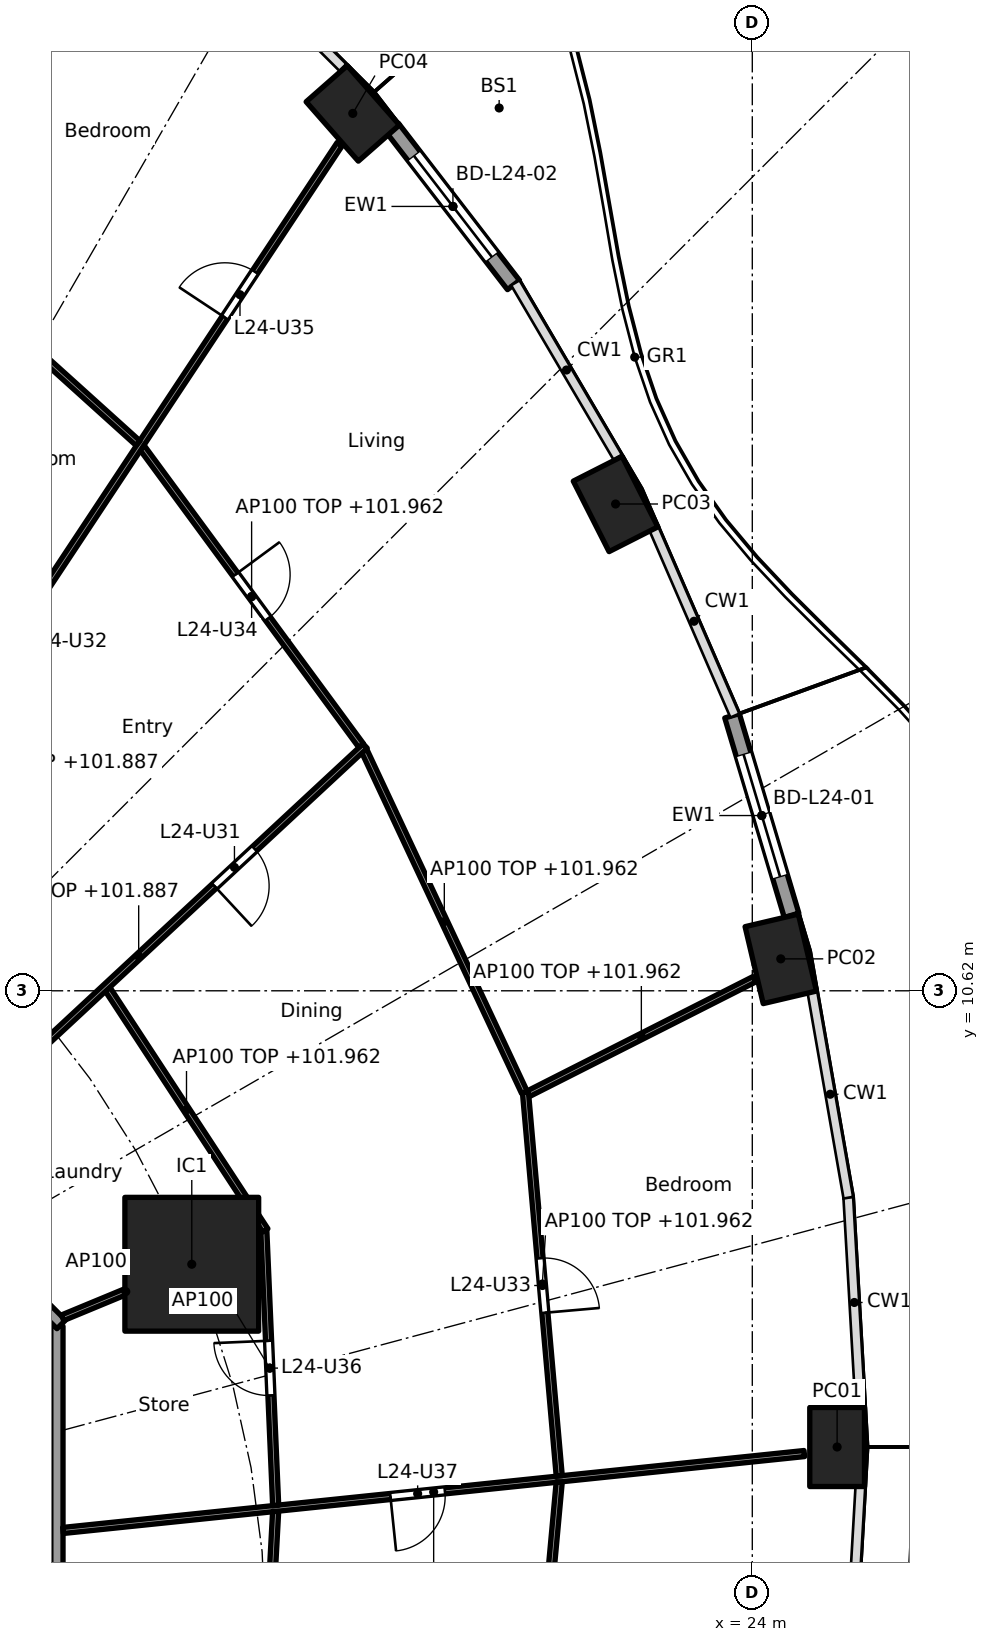
"""IFC4 building model, lengths in metres.
Left out: names, types, materials, properties, quantities, classifications, styles, units other than length and angle.
Written with IfcOpenShell. Run it as: python <this file> out.ifc"""

import sys

from ifc_helpers import new_model, si_unit, direction, frame, frame_2d, origin, origin_2d, place, context, subcontext, project, spatial, rectangle, hollow_rectangle, extrude, element, fill, save


model = new_model("IFC4")
c1 = context("Model", 3, precision=1e-05, world=origin(), true_north=direction((0.0, 1.0)))
c2 = subcontext(c1, "Body", "Model", "MODEL_VIEW")
j1 = project(units=[si_unit("LENGTHUNIT", "METRE"), si_unit("PLANEANGLEUNIT", "RADIAN")], contexts=[c1])
p1 = place(None, origin())
s1 = spatial("IfcSite", under=j1, at=p1, CompositionType="ELEMENT")
p2 = place(p1, origin())
s2 = spatial("IfcBuilding", under=s1, at=p2, CompositionType="ELEMENT")
p3 = place(p2, frame((0.0, 0.0, 99.2)))
s3 = spatial("IfcBuildingStorey", under=s2, at=p3, CompositionType="ELEMENT", Elevation=99.2)
for number, where, z_axis, x_axis in (
    (1, (25.395, 3.118, 0.0), (0.0, 0.0, 1.0), (0.0, 1.0, 0.0)),
    (2, (24.468, 11.145, 0.0), (0.0, 0.0, 1.0), (-0.229, 0.973, 0.0)),
    (3, (21.751, 18.625, 0.0), (0.0, 0.0, 1.0), (-0.452, 0.892, 0.0)),
    (4, (17.43, 25.049, 0.0), (0.0, 0.0, 1.0), (-0.66, 0.751, 0.0)),
):
    element("IfcColumn", number, at=place(p3, frame(where, z_axis=z_axis, x_axis=x_axis)), inside=s3, PredefinedType="COLUMN", context=c2, shape_type="SweptSolid", body=[
        extrude(hollow_rectangle(XDim=1.3, YDim=0.9, WallThickness=0.045, at=origin_2d()), origin(), (0.0, 0.0, 1.0), 3.7),
    ])
p4 = place(p3, frame((14.782, 6.123, 0.0), z_axis=(0.0, 0.0, 1.0), x_axis=(1.0, 0.0, 0.0)))
e5 = element("IfcColumn", 5, at=p4, inside=s3, PredefinedType="COLUMN", context=c2, shape_type="SweptSolid", body=[
    extrude(rectangle(XDim=2.2, YDim=2.2, at=origin_2d()), origin(), (0.0, 0.0, 1.0), 3.7),
])
p5 = place(p3, frame((23.667, 15.142, 0.0), z_axis=(0.0, 0.0, 1.0), x_axis=(0.285882094477, -0.958264800594, 0.0)))
e6 = element("IfcWall", 6, at=p5, inside=s3, PredefinedType="SOLIDWALL", context=c2, shape_type="SweptSolid", body=[
    extrude(rectangle(XDim=3.424, YDim=0.25, at=frame_2d((1.712, 0.0))), origin(), (0.0, 0.0, 1.0), 3.44),
])
p6 = place(p5, frame((0.662, 0.0, 0.0)))
e7 = element("IfcOpeningElement", 7, at=p6, cuts=e6, PredefinedType="OPENING", context=c2, shape_type="SweptSolid", body=[
    extrude(rectangle(XDim=2.1, YDim=2.4, at=frame_2d((1.05, 1.2))), frame((0.0, 0.135, 0.0), z_axis=(0.0, -1.0, 0.0), x_axis=(1.0, 0.0, 0.0)), (0.0, 0.0, 1.0), 0.27),
])
p7 = place(p3, frame((18.081, 24.811, 0.0), z_axis=(0.0, 0.0, 1.0), x_axis=(0.610458970322, -0.792047880847, 0.0)))
e8 = element("IfcWall", 8, at=p7, inside=s3, PredefinedType="SOLIDWALL", context=c2, shape_type="SweptSolid", body=[
    extrude(rectangle(XDim=3.263, YDim=0.25, at=frame_2d((1.631, 0.0))), origin(), (0.0, 0.0, 1.0), 3.44),
])
p8 = place(p7, frame((0.582, 0.0, 0.0)))
e9 = element("IfcOpeningElement", 9, at=p8, cuts=e8, PredefinedType="OPENING", context=c2, shape_type="SweptSolid", body=[
    extrude(rectangle(XDim=2.1, YDim=2.4, at=frame_2d((1.05, 1.2))), frame((0.0, 0.135, 0.0), z_axis=(0.0, -1.0, 0.0), x_axis=(1.0, 0.0, 0.0)), (0.0, 0.0, 1.0), 0.27),
])
p9 = place(p3, frame((12.565, -5.104, 0.0), z_axis=(0.0, 0.0, 1.0), x_axis=(0.0, 1.0, 0.0)))
e10 = element("IfcWall", 10, at=p9, inside=s3, PredefinedType="PARTITIONING", context=c2, shape_type="SweptSolid", body=[
    extrude(rectangle(XDim=10.209, YDim=0.2, at=frame_2d((5.104, 0.0))), origin(), (0.0, 0.0, 1.0), 3.44),
])
p10 = place(p3, frame((12.635, 5.134, 0.0), z_axis=(0.0, 0.0, 1.0), x_axis=(-0.707106781187, 0.707106781187, 0.0)))
e11 = element("IfcWall", 11, at=p10, inside=s3, PredefinedType="PARTITIONING", context=c2, shape_type="SweptSolid", body=[
    extrude(rectangle(XDim=10.609, YDim=0.2, at=frame_2d((5.305, 0.0))), origin(), (0.0, 0.0, 1.0), 3.44),
])
p11 = place(p10, frame((4.804, 0.0, 0.0)))
e12 = element("IfcOpeningElement", 12, at=p11, cuts=e11, PredefinedType="OPENING", context=c2, shape_type="SweptSolid", body=[
    extrude(rectangle(XDim=1.0, YDim=2.1, at=frame_2d((0.5, 1.05))), frame((0.0, 0.11, 0.0), z_axis=(0.0, -1.0, 0.0), x_axis=(1.0, 0.0, 0.0)), (0.0, 0.0, 1.0), 0.22),
])
p12 = place(p3, frame((12.664, 1.745, 0.0), z_axis=(0.0, 0.0, 1.0), x_axis=(0.994662790212, 0.103179134358, 0.0)))
e13 = element("IfcWall", 13, at=p12, inside=s3, PredefinedType="PARTITIONING", context=c2, shape_type="SweptSolid", body=[
    extrude(rectangle(XDim=12.257, YDim=0.1, at=frame_2d((6.128, 0.0))), origin(), (0.0, 0.0, 1.0), 2.687),
])
p13 = place(p12, frame((5.414, 0.0, 0.0)))
e14 = element("IfcOpeningElement", 14, at=p13, cuts=e13, PredefinedType="OPENING", context=c2, shape_type="SweptSolid", body=[
    extrude(rectangle(XDim=0.9, YDim=2.1, at=frame_2d((0.45, 1.05))), frame((0.0, 0.06, 0.0), z_axis=(0.0, -1.0, 0.0), x_axis=(1.0, 0.0, 0.0)), (0.0, 0.0, 1.0), 0.12),
])
p14 = place(p3, frame((16.162, 2.158, 0.0), z_axis=(0.0, 0.0, 1.0), x_axis=(-0.043120653248, 0.999069872063, 0.0)))
e15 = element("IfcWall", 15, at=p14, inside=s3, PredefinedType="PARTITIONING", context=c2, shape_type="SweptSolid", body=[
    extrude(rectangle(XDim=4.518, YDim=0.1, at=frame_2d((2.259, 0.0))), origin(), (0.0, 0.0, 1.0), 3.44),
])
p15 = place(p14, frame((1.809, 0.0, 0.0)))
e16 = element("IfcOpeningElement", 16, at=p15, cuts=e15, PredefinedType="OPENING", context=c2, shape_type="SweptSolid", body=[
    extrude(rectangle(XDim=0.9, YDim=2.1, at=frame_2d((0.45, 1.05))), frame((0.0, 0.06, 0.0), z_axis=(0.0, -1.0, 0.0), x_axis=(1.0, 0.0, 0.0)), (0.0, 0.0, 1.0), 0.12),
])
p16 = place(p3, frame((16.161, 2.058, 0.0), z_axis=(0.0, 0.0, 1.0), x_axis=(-0.053696394729, -0.998557307916, 0.0)))
e17 = element("IfcWall", 17, at=p16, inside=s3, PredefinedType="PARTITIONING", context=c2, shape_type="SweptSolid", body=[
    extrude(rectangle(XDim=4.742, YDim=0.1, at=frame_2d((2.371, 0.0))), origin(), (0.0, 0.0, 1.0), 2.762),
])
p17 = place(p16, frame((1.896, 0.0, 0.0)))
e18 = element("IfcOpeningElement", 18, at=p17, cuts=e17, PredefinedType="OPENING", context=c2, shape_type="SweptSolid", body=[
    extrude(rectangle(XDim=0.9, YDim=2.1, at=frame_2d((0.45, 1.05))), frame((0.0, 0.06, 0.0), z_axis=(0.0, -1.0, 0.0), x_axis=(1.0, 0.0, 0.0)), (0.0, 0.0, 1.0), 0.12),
])
p18 = place(p3, frame((20.825, 2.642, 0.0), z_axis=(0.0, 0.0, 1.0), x_axis=(-0.08776338161, 0.996141349834, 0.0)))
e19 = element("IfcWall", 19, at=p18, inside=s3, PredefinedType="PARTITIONING", context=c2, shape_type="SweptSolid", body=[
    extrude(rectangle(XDim=6.337, YDim=0.1, at=frame_2d((3.168, 0.0))), origin(), (0.0, 0.0, 1.0), 2.762),
])
p19 = place(p18, frame((2.694, 0.0, 0.0)))
e20 = element("IfcOpeningElement", 20, at=p19, cuts=e19, PredefinedType="OPENING", context=c2, shape_type="SweptSolid", body=[
    extrude(rectangle(XDim=0.9, YDim=2.1, at=frame_2d((0.45, 1.05))), frame((0.0, 0.06, 0.0), z_axis=(0.0, -1.0, 0.0), x_axis=(1.0, 0.0, 0.0)), (0.0, 0.0, 1.0), 0.12),
])
p20 = place(p3, frame((20.825, 2.542, 0.0), z_axis=(0.0, 0.0, 1.0), x_axis=(-0.09140211812, -0.995814065377, 0.0)))
e21 = element("IfcWall", 21, at=p20, inside=s3, PredefinedType="PARTITIONING", context=c2, shape_type="SweptSolid", body=[
    extrude(rectangle(XDim=6.403, YDim=0.1, at=frame_2d((3.201, 0.0))), origin(), (0.0, 0.0, 1.0), 2.762),
])
p21 = place(p20, frame((2.726, 0.0, 0.0)))
e22 = element("IfcOpeningElement", 22, at=p21, cuts=e21, PredefinedType="OPENING", context=c2, shape_type="SweptSolid", body=[
    extrude(rectangle(XDim=0.9, YDim=2.1, at=frame_2d((0.45, 1.05))), frame((0.0, 0.06, 0.0), z_axis=(0.0, -1.0, 0.0), x_axis=(1.0, 0.0, 0.0)), (0.0, 0.0, 1.0), 0.12),
])
p22 = place(p3, frame((12.657, 5.243, 0.0), z_axis=(0.0, 0.0, 1.0), x_axis=(0.923864733477, 0.382719158442, 0.0)))
e23 = element("IfcWall", 23, at=p22, inside=s3, PredefinedType="PARTITIONING", context=c2, shape_type="SweptSolid", body=[
    extrude(rectangle(XDim=2.25, YDim=0.1, at=frame_2d((1.125, 0.0))), origin(), (0.0, 0.0, 1.0), 3.44),
])
p23 = place(p3, frame((15.992, 6.68, 0.0), z_axis=(0.0, 0.0, 1.0), x_axis=(-0.547472878942, 0.836823426311, 0.0)))
e24 = element("IfcWall", 24, at=p23, inside=s3, PredefinedType="PARTITIONING", context=c2, shape_type="SweptSolid", body=[
    extrude(rectangle(XDim=4.738, YDim=0.1, at=frame_2d((2.369, 0.0))), origin(), (0.0, 0.0, 1.0), 2.762),
])
p24 = place(p3, frame((20.318, 8.927, 0.0), z_axis=(0.0, 0.0, 1.0), x_axis=(0.892057836959, 0.451921249246, 0.0)))
e25 = element("IfcWall", 25, at=p24, inside=s3, PredefinedType="PARTITIONING", context=c2, shape_type="SweptSolid", body=[
    extrude(rectangle(XDim=4.164, YDim=0.1, at=frame_2d((2.082, 0.0))), origin(), (0.0, 0.0, 1.0), 2.762),
])
p25 = place(p3, frame((20.252, 8.95, 0.0), z_axis=(0.0, 0.0, 1.0), x_axis=(-0.424580052627, 0.90539040138, 0.0)))
e26 = element("IfcWall", 26, at=p25, inside=s3, PredefinedType="PARTITIONING", context=c2, shape_type="SweptSolid", body=[
    extrude(rectangle(XDim=6.204, YDim=0.1, at=frame_2d((3.102, 0.0))), origin(), (0.0, 0.0, 1.0), 2.762),
])
p26 = place(p3, frame((10.185, 7.726, 0.0), z_axis=(0.0, 0.0, 1.0), x_axis=(0.732598472978, 0.680661059112, 0.0)))
e27 = element("IfcWall", 27, at=p26, inside=s3, PredefinedType="PARTITIONING", context=c2, shape_type="SweptSolid", body=[
    extrude(rectangle(XDim=10.167, YDim=0.1, at=frame_2d((5.084, 0.0))), origin(), (0.0, 0.0, 1.0), 2.687),
])
p27 = place(p26, frame((1.725, 0.0, 0.0)))
e28 = element("IfcOpeningElement", 28, at=p27, cuts=e27, PredefinedType="OPENING", context=c2, shape_type="SweptSolid", body=[
    extrude(rectangle(XDim=0.9, YDim=2.1, at=frame_2d((0.45, 1.05))), frame((0.0, 0.06, 0.0), z_axis=(0.0, -1.0, 0.0), x_axis=(1.0, 0.0, 0.0)), (0.0, 0.0, 1.0), 0.12),
])
p28 = place(p26, frame((6.784, 0.0, 0.0)))
e29 = element("IfcOpeningElement", 29, at=p28, cuts=e27, PredefinedType="OPENING", context=c2, shape_type="SweptSolid", body=[
    extrude(rectangle(XDim=0.9, YDim=2.1, at=frame_2d((0.45, 1.05))), frame((0.0, 0.06, 0.0), z_axis=(0.0, -1.0, 0.0), x_axis=(1.0, 0.0, 0.0)), (0.0, 0.0, 1.0), 0.12),
])
p29 = place(p3, frame((17.567, 14.653, 0.0), z_axis=(0.0, 0.0, 1.0), x_axis=(-0.592391983588, 0.80564988536, 0.0)))
e30 = element("IfcWall", 30, at=p29, inside=s3, PredefinedType="PARTITIONING", context=c2, shape_type="SweptSolid", body=[
    extrude(rectangle(XDim=6.08, YDim=0.1, at=frame_2d((3.04, 0.0))), origin(), (0.0, 0.0, 1.0), 2.762),
])
p30 = place(p29, frame((2.59, 0.0, 0.0)))
e31 = element("IfcOpeningElement", 31, at=p30, cuts=e30, PredefinedType="OPENING", context=c2, shape_type="SweptSolid", body=[
    extrude(rectangle(XDim=0.9, YDim=2.1, at=frame_2d((0.45, 1.05))), frame((0.0, 0.06, 0.0), z_axis=(0.0, -1.0, 0.0), x_axis=(1.0, 0.0, 0.0)), (0.0, 0.0, 1.0), 0.12),
])
p31 = place(p3, frame((7.713, 10.195, 0.0), z_axis=(0.0, 0.0, 1.0), x_axis=(0.552111071171, 0.833770571015, 0.0)))
e32 = element("IfcWall", 32, at=p31, inside=s3, PredefinedType="PARTITIONING", context=c2, shape_type="SweptSolid", body=[
    extrude(rectangle(XDim=17.208, YDim=0.1, at=frame_2d((8.604, 0.0))), origin(), (0.0, 0.0, 1.0), 2.687),
])
p32 = place(p31, frame((1.976, 0.0, 0.0)))
e33 = element("IfcOpeningElement", 33, at=p32, cuts=e32, PredefinedType="OPENING", context=c2, shape_type="SweptSolid", body=[
    extrude(rectangle(XDim=0.9, YDim=2.1, at=frame_2d((0.45, 1.05))), frame((0.0, 0.06, 0.0), z_axis=(0.0, -1.0, 0.0), x_axis=(1.0, 0.0, 0.0)), (0.0, 0.0, 1.0), 0.12),
])
p33 = place(p31, frame((7.611, 0.0, 0.0)))
e34 = element("IfcOpeningElement", 34, at=p33, cuts=e32, PredefinedType="OPENING", context=c2, shape_type="SweptSolid", body=[
    extrude(rectangle(XDim=0.9, YDim=2.1, at=frame_2d((0.45, 1.05))), frame((0.0, 0.06, 0.0), z_axis=(0.0, -1.0, 0.0), x_axis=(1.0, 0.0, 0.0)), (0.0, 0.0, 1.0), 0.12),
])
p34 = place(p31, frame((13.79, 0.0, 0.0)))
e35 = element("IfcOpeningElement", 35, at=p34, cuts=e32, PredefinedType="OPENING", context=c2, shape_type="SweptSolid", body=[
    extrude(rectangle(XDim=0.9, YDim=2.1, at=frame_2d((0.45, 1.05))), frame((0.0, 0.06, 0.0), z_axis=(0.0, -1.0, 0.0), x_axis=(1.0, 0.0, 0.0)), (0.0, 0.0, 1.0), 0.12),
])
p35 = place(p3, frame((13.898, 19.625, 0.0), z_axis=(0.0, 0.0, 1.0), x_axis=(-0.742396654702, 0.669960601146, 0.0)))
e36 = element("IfcWall", 36, at=p35, inside=s3, PredefinedType="PARTITIONING", context=c2, shape_type="SweptSolid", body=[
    extrude(rectangle(XDim=5.861, YDim=0.1, at=frame_2d((2.931, 0.0))), origin(), (0.0, 0.0, 1.0), 2.762),
])
p36 = place(p35, frame((3.958, 0.0, 0.0)))
e37 = element("IfcOpeningElement", 37, at=p36, cuts=e36, PredefinedType="OPENING", context=c2, shape_type="SweptSolid", body=[
    extrude(rectangle(XDim=0.9, YDim=2.1, at=frame_2d((0.45, 1.05))), frame((0.0, 0.06, 0.0), z_axis=(0.0, -1.0, 0.0), x_axis=(1.0, 0.0, 0.0)), (0.0, 0.0, 1.0), 0.12),
])
p37 = place(p6, origin())
e38 = element("IfcDoor", 38, at=p37, inside=s3, OperationType="SLIDING_TO_LEFT", PredefinedType="DOOR", context=c2, shape_type="SweptSolid", body=[
    extrude(rectangle(XDim=2.1, YDim=2.4, at=frame_2d((1.05, 1.2))), frame((0.0, 0.025, 0.0), z_axis=(0.0, -1.0, 0.0), x_axis=(1.0, 0.0, 0.0)), (0.0, 0.0, 1.0), 0.05),
])
fill(e7, e38)
p38 = place(p8, origin())
e39 = element("IfcDoor", 39, at=p38, inside=s3, OperationType="SLIDING_TO_LEFT", PredefinedType="DOOR", context=c2, shape_type="SweptSolid", body=[
    extrude(rectangle(XDim=2.1, YDim=2.4, at=frame_2d((1.05, 1.2))), frame((0.0, 0.025, 0.0), z_axis=(0.0, -1.0, 0.0), x_axis=(1.0, 0.0, 0.0)), (0.0, 0.0, 1.0), 0.05),
])
fill(e9, e39)
p39 = place(p28, frame((0.9, 0.0, 0.0), x_axis=(-1.0, 0.0, 0.0)))
e40 = element("IfcDoor", 40, at=p39, inside=s3, OperationType="SINGLE_SWING_RIGHT", PredefinedType="DOOR", context=c2, shape_type="SweptSolid", body=[
    extrude(rectangle(XDim=0.9, YDim=2.1, at=frame_2d((0.45, 1.05))), frame((0.0, 0.025, 0.0), z_axis=(0.0, -1.0, 0.0), x_axis=(1.0, 0.0, 0.0)), (0.0, 0.0, 1.0), 0.05),
])
fill(e29, e40)
p40 = place(p19, frame((0.9, 0.0, 0.0), x_axis=(-1.0, 0.0, 0.0)))
e41 = element("IfcDoor", 41, at=p40, inside=s3, OperationType="SINGLE_SWING_RIGHT", PredefinedType="DOOR", context=c2, shape_type="SweptSolid", body=[
    extrude(rectangle(XDim=0.9, YDim=2.1, at=frame_2d((0.45, 1.05))), frame((0.0, 0.025, 0.0), z_axis=(0.0, -1.0, 0.0), x_axis=(1.0, 0.0, 0.0)), (0.0, 0.0, 1.0), 0.05),
])
fill(e20, e41)
p41 = place(p30, frame((0.9, 0.0, 0.0), x_axis=(-1.0, 0.0, 0.0)))
e42 = element("IfcDoor", 42, at=p41, inside=s3, OperationType="SINGLE_SWING_LEFT", PredefinedType="DOOR", context=c2, shape_type="SweptSolid", body=[
    extrude(rectangle(XDim=0.9, YDim=2.1, at=frame_2d((0.45, 1.05))), frame((0.0, 0.025, 0.0), z_axis=(0.0, -1.0, 0.0), x_axis=(1.0, 0.0, 0.0)), (0.0, 0.0, 1.0), 0.05),
])
fill(e31, e42)
p42 = place(p34, origin())
e43 = element("IfcDoor", 43, at=p42, inside=s3, OperationType="SINGLE_SWING_LEFT", PredefinedType="DOOR", context=c2, shape_type="SweptSolid", body=[
    extrude(rectangle(XDim=0.9, YDim=2.1, at=frame_2d((0.45, 1.05))), frame((0.0, 0.025, 0.0), z_axis=(0.0, -1.0, 0.0), x_axis=(1.0, 0.0, 0.0)), (0.0, 0.0, 1.0), 0.05),
])
fill(e35, e43)
p43 = place(p15, origin())
e44 = element("IfcDoor", 44, at=p43, inside=s3, OperationType="SINGLE_SWING_RIGHT", PredefinedType="DOOR", context=c2, shape_type="SweptSolid", body=[
    extrude(rectangle(XDim=0.9, YDim=2.1, at=frame_2d((0.45, 1.05))), frame((0.0, 0.025, 0.0), z_axis=(0.0, -1.0, 0.0), x_axis=(1.0, 0.0, 0.0)), (0.0, 0.0, 1.0), 0.05),
])
fill(e16, e44)
p44 = place(p13, frame((0.9, 0.0, 0.0), x_axis=(-1.0, 0.0, 0.0)))
e45 = element("IfcDoor", 45, at=p44, inside=s3, OperationType="SINGLE_SWING_RIGHT", PredefinedType="DOOR", context=c2, shape_type="SweptSolid", body=[
    extrude(rectangle(XDim=0.9, YDim=2.1, at=frame_2d((0.45, 1.05))), frame((0.0, 0.025, 0.0), z_axis=(0.0, -1.0, 0.0), x_axis=(1.0, 0.0, 0.0)), (0.0, 0.0, 1.0), 0.05),
])
fill(e14, e45)
save(model, sys.argv[1])
